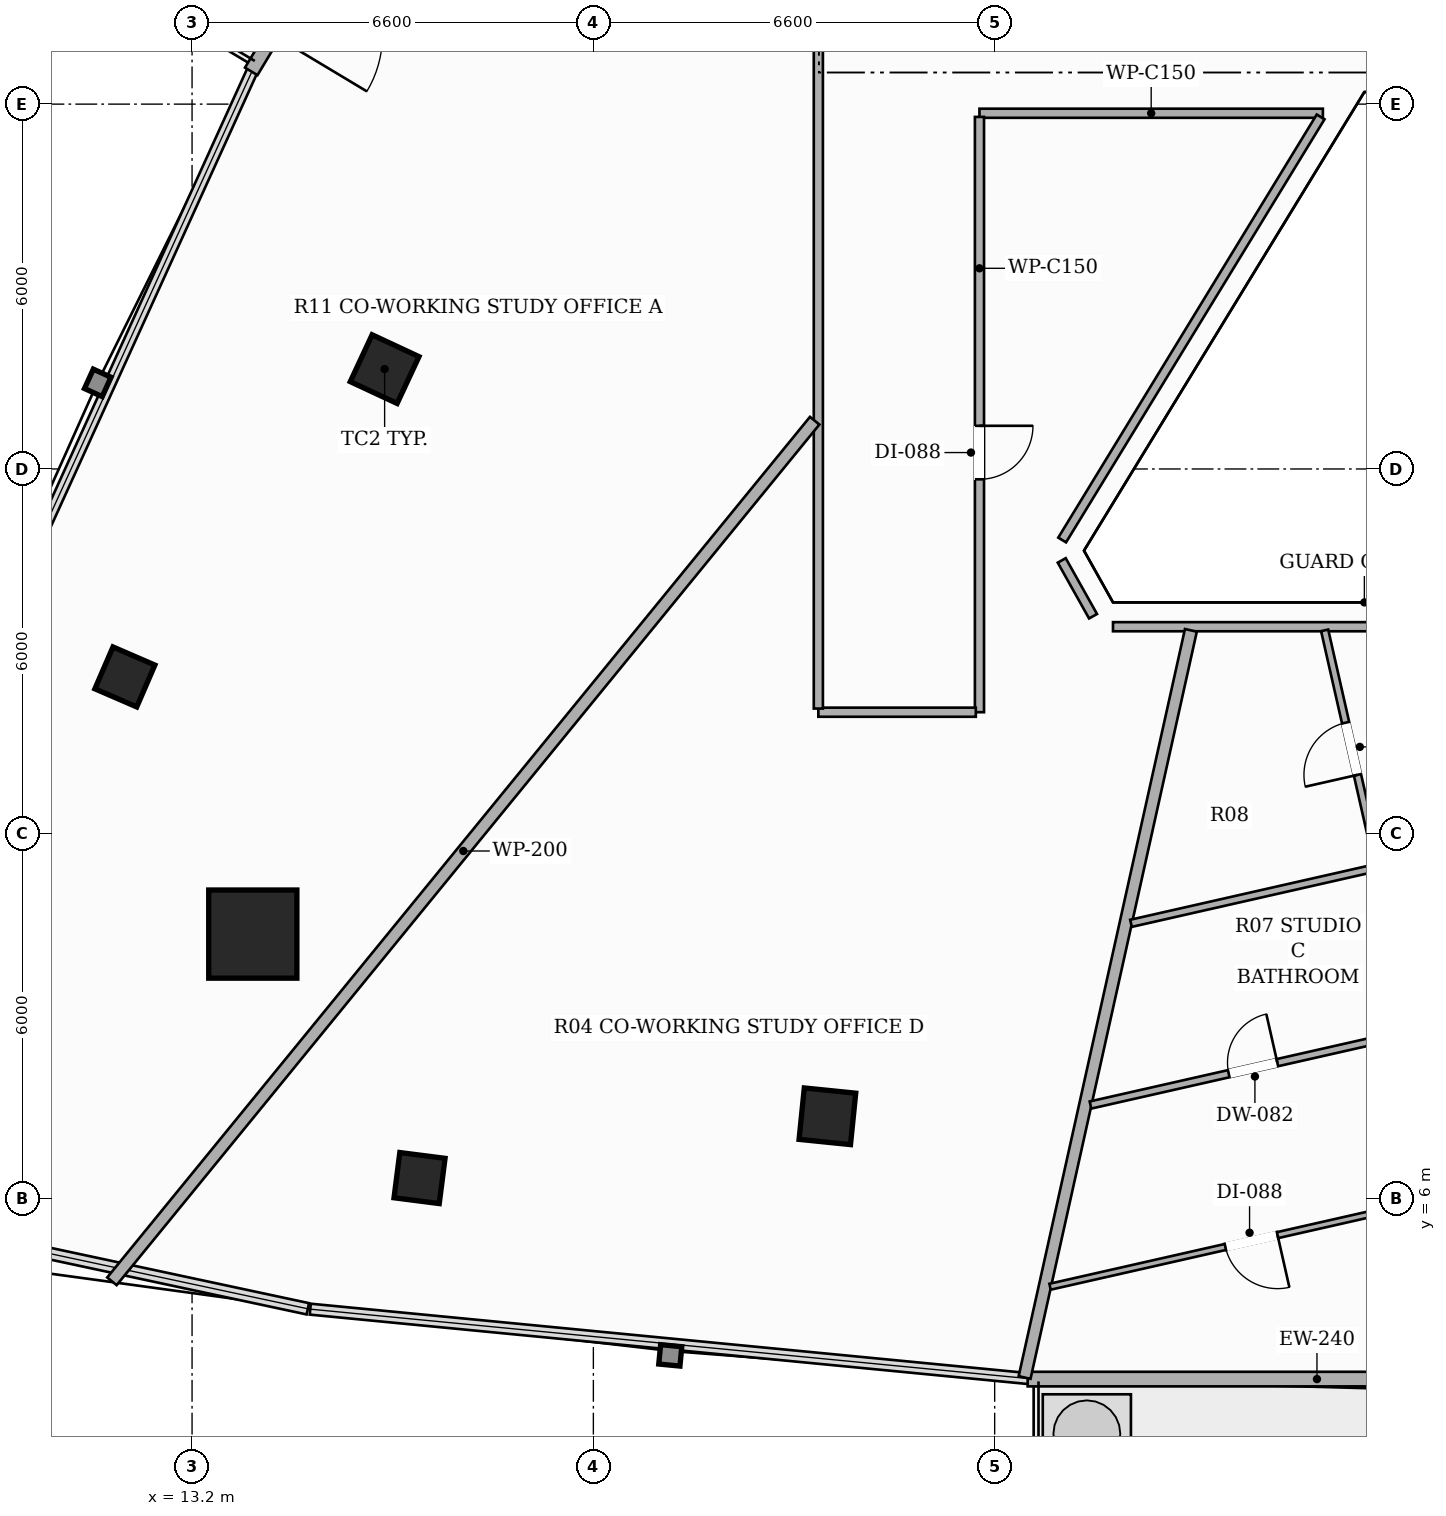
"""IFC4 building model, lengths in metres.
Left out: names, types, materials, properties, quantities, classifications, styles, units other than length and angle.
Written with IfcOpenShell. Run it as: python <this file> out.ifc"""

import sys

from ifc_helpers import new_model, si_unit, direction, frame, frame_2d, origin, origin_2d, place, context, subcontext, project, spatial, rectangle, hollow_rectangle, extrude, element, fill, save


model = new_model("IFC4")
c1 = context("Model", 3, precision=1e-05, world=origin(), true_north=direction((0.0, 1.0)))
c2 = subcontext(c1, "Body", "Model", "MODEL_VIEW")
j1 = project(units=[si_unit("LENGTHUNIT", "METRE"), si_unit("PLANEANGLEUNIT", "RADIAN")], contexts=[c1])
p1 = place(None, origin())
s1 = spatial("IfcSite", under=j1, at=p1, CompositionType="ELEMENT")
p2 = place(p1, origin())
s2 = spatial("IfcBuilding", under=s1, at=p2, CompositionType="ELEMENT")
p3 = place(p2, frame((0.0, 0.0, 123.2)))
s3 = spatial("IfcBuildingStorey", under=s2, at=p3, CompositionType="ELEMENT", Elevation=123.2)
p4 = place(p3, frame((14.199, 10.351, 0.0), z_axis=(0.0, 0.0, 1.0), x_axis=(1.0, 0.0, 0.0)))
e1 = element("IfcColumn", 1, at=p4, inside=s3, PredefinedType="COLUMN", context=c2, shape_type="SweptSolid", body=[
    extrude(hollow_rectangle(XDim=1.45, YDim=1.45, WallThickness=0.045, at=origin_2d()), origin(), (0.0, 0.0, 1.0), 3.3),
])
for number, where, z_axis, x_axis in (
    (2, (16.367, 19.642, 0.0), (0.0, 0.0, 1.0), (0.423, 0.906, 0.0)),
    (3, (23.649, 7.355, 0.0), (0.0, 0.0, 1.0), (-0.995, 0.101, 0.0)),
):
    element("IfcColumn", number, at=place(p3, frame(where, z_axis=z_axis, x_axis=x_axis)), inside=s3, PredefinedType="COLUMN", context=c2, shape_type="SweptSolid", body=[
        extrude(hollow_rectangle(XDim=0.85, YDim=0.85, WallThickness=0.028, at=origin_2d()), origin(), (0.0, 0.0, 1.0), 3.3),
    ])
for number, where, z_axis, x_axis in (
    (4, (12.095, 14.58, 0.0), (0.0, 0.0, 1.0), (0.397, 0.918, 0.0)),
    (5, (16.941, 6.339, 0.0), (0.0, 0.0, 1.0), (-0.992, 0.127, 0.0)),
):
    element("IfcColumn", number, at=place(p3, frame(where, z_axis=z_axis, x_axis=x_axis)), inside=s3, PredefinedType="COLUMN", context=c2, shape_type="SweptSolid", body=[
        extrude(hollow_rectangle(XDim=0.75, YDim=0.75, WallThickness=0.025, at=origin_2d()), origin(), (0.0, 0.0, 1.0), 3.3),
    ])
p5 = place(p3, frame((20.2, 34.586, 0.0), z_axis=(0.0, 0.0, 1.0), x_axis=(-0.514379309275, -0.857562782652, 0.0)))
e6 = element("IfcWall", 6, at=p5, inside=s3, PredefinedType="SOLIDWALL", context=c2, shape_type="SweptSolid", body=[
    extrude(rectangle(XDim=11.717, YDim=0.24, at=frame_2d((5.858, 0.0))), origin(), (0.0, 0.0, 1.0), 2.624),
])
p6 = place(p5, frame((9.22, 0.0, 0.0)))
e7 = element("IfcOpeningElement", 7, at=p6, cuts=e6, PredefinedType="OPENING", context=c2, shape_type="SweptSolid", body=[
    extrude(rectangle(XDim=1.8, YDim=2.2, at=frame_2d((0.9, 1.1))), frame((0.0, 0.13, 0.0), z_axis=(0.0, -1.0, 0.0), x_axis=(1.0, 0.0, 0.0)), (0.0, 0.0, 1.0), 0.26),
])
p7 = place(p3, frame((26.943, 3.033, 0.0), z_axis=(0.0, 0.0, 1.0), x_axis=(1.0, 0.0, 0.0)))
e8 = element("IfcWall", 8, at=p7, inside=s3, PredefinedType="SOLIDWALL", context=c2, shape_type="SweptSolid", body=[
    extrude(rectangle(XDim=12.114, YDim=0.24, at=frame_2d((6.057, 0.0))), origin(), (0.0, 0.0, 1.0), 2.624),
])
p8 = place(p7, frame((9.615, 0.0, 0.0)))
e9 = element("IfcOpeningElement", 9, at=p8, cuts=e8, PredefinedType="OPENING", context=c2, shape_type="SweptSolid", body=[
    extrude(rectangle(XDim=1.8, YDim=2.2, at=frame_2d((0.9, 1.1))), frame((0.0, 0.13, 0.0), z_axis=(0.0, -1.0, 0.0), x_axis=(1.0, 0.0, 0.0)), (0.0, 0.0, 1.0), 0.26),
])
p9 = place(p3, frame((31.798, 23.85, 0.0), z_axis=(0.0, 0.0, 1.0), x_axis=(-1.0, 0.0, 0.0)))
e10 = element("IfcWall", 10, at=p9, inside=s3, PredefinedType="PARTITIONING", context=c2, shape_type="SweptSolid", body=[
    extrude(rectangle(XDim=5.648, YDim=0.15, at=frame_2d((2.824, 0.0))), origin(), (0.0, 0.0, 1.0), 2.721),
])
p10 = place(p3, frame((26.15, 23.79, 0.0), z_axis=(0.0, 0.0, 1.0), x_axis=(0.0, -1.0, 0.0)))
e11 = element("IfcWall", 11, at=p10, inside=s3, PredefinedType="PARTITIONING", context=c2, shape_type="SweptSolid", body=[
    extrude(rectangle(XDim=9.79, YDim=0.15, at=frame_2d((4.895, 0.0))), origin(), (0.0, 0.0, 1.0), 2.721),
])
p11 = place(p10, frame((5.08, 0.0, 0.0)))
e12 = element("IfcOpeningElement", 12, at=p11, cuts=e11, PredefinedType="OPENING", context=c2, shape_type="SweptSolid", body=[
    extrude(rectangle(XDim=0.88, YDim=2.1, at=frame_2d((0.44, 1.05))), frame((0.0, 0.085, 0.0), z_axis=(0.0, -1.0, 0.0), x_axis=(1.0, 0.0, 0.0)), (0.0, 0.0, 1.0), 0.17),
])
p12 = place(p3, frame((26.09, 14.0, 0.0), z_axis=(0.0, 0.0, 1.0), x_axis=(-1.0, 0.0, 0.0)))
e13 = element("IfcWall", 13, at=p12, inside=s3, PredefinedType="PARTITIONING", context=c2, shape_type="SweptSolid", body=[
    extrude(rectangle(XDim=2.59, YDim=0.15, at=frame_2d((1.295, 0.0))), origin(), (0.0, 0.0, 1.0), 2.721),
])
p13 = place(p3, frame((23.5, 14.06, 0.0), z_axis=(0.0, 0.0, 1.0), x_axis=(0.0, 1.0, 0.0)))
e14 = element("IfcWall", 14, at=p13, inside=s3, PredefinedType="PARTITIONING", context=c2, shape_type="SweptSolid", body=[
    extrude(rectangle(XDim=22.84, YDim=0.15, at=frame_2d((11.42, 0.0))), origin(), (0.0, 0.0, 1.0), 2.413),
])
p14 = place(p13, frame((13.17, 0.0, 0.0)))
e15 = element("IfcOpeningElement", 15, at=p14, cuts=e14, PredefinedType="OPENING", context=c2, shape_type="SweptSolid", body=[
    extrude(rectangle(XDim=0.88, YDim=2.1, at=frame_2d((0.44, 1.05))), frame((0.0, 0.085, 0.0), z_axis=(0.0, -1.0, 0.0), x_axis=(1.0, 0.0, 0.0)), (0.0, 0.0, 1.0), 0.17),
])
p15 = place(p3, frame((37.654, 15.406, 0.0), z_axis=(0.0, 0.0, 1.0), x_axis=(-1.0, 0.0, 0.0)))
e16 = element("IfcWall", 16, at=p15, inside=s3, PredefinedType="PARTITIONING", context=c2, shape_type="SweptSolid", body=[
    extrude(rectangle(XDim=9.308, YDim=0.15, at=frame_2d((4.654, 0.0))), origin(), (0.0, 0.0, 1.0), 2.721),
])
p16 = place(p3, frame((28.018, 15.578, 0.0), z_axis=(0.0, 0.0, 1.0), x_axis=(-0.489281087794, 0.872126147485, 0.0)))
e17 = element("IfcWall", 17, at=p16, inside=s3, PredefinedType="PARTITIONING", context=c2, shape_type="SweptSolid", body=[
    extrude(rectangle(XDim=1.053, YDim=0.15, at=frame_2d((0.526, 0.0))), origin(), (0.0, 0.0, 1.0), 3.06),
])
p17 = place(p3, frame((27.51, 16.832, 0.0), z_axis=(0.0, 0.0, 1.0), x_axis=(0.521348270591, 0.853343999072, 0.0)))
e18 = element("IfcWall", 18, at=p17, inside=s3, PredefinedType="PARTITIONING", context=c2, shape_type="SweptSolid", body=[
    extrude(rectangle(XDim=8.154, YDim=0.15, at=frame_2d((4.077, 0.0))), origin(), (0.0, 0.0, 1.0), 2.721),
])
p18 = place(p3, frame((23.44, 18.794, 0.0), z_axis=(0.0, 0.0, 1.0), x_axis=(-0.632525219644, -0.774539764321, 0.0)))
e19 = element("IfcWall", 19, at=p18, inside=s3, PredefinedType="PARTITIONING", context=c2, shape_type="SweptSolid", body=[
    extrude(rectangle(XDim=18.272, YDim=0.2, at=frame_2d((9.136, 0.0))), origin(), (0.0, 0.0, 1.0), 2.413),
])
p19 = place(p3, frame((26.892, 3.059, 0.0), z_axis=(0.0, 0.0, 1.0), x_axis=(0.217267240277, 0.97611215867, 0.0)))
e20 = element("IfcWall", 20, at=p19, inside=s3, PredefinedType="PARTITIONING", context=c2, shape_type="SweptSolid", body=[
    extrude(rectangle(XDim=12.588, YDim=0.2, at=frame_2d((6.294, 0.0))), origin(), (0.0, 0.0, 1.0), 2.413),
])
p20 = place(p3, frame((27.976, 7.54, 0.0), z_axis=(0.0, 0.0, 1.0), x_axis=(0.975262605336, 0.221049430295, 0.0)))
e21 = element("IfcWall", 21, at=p20, inside=s3, PredefinedType="PARTITIONING", context=c2, shape_type="SweptSolid", body=[
    extrude(rectangle(XDim=5.483, YDim=0.12, at=frame_2d((2.741, 0.0))), origin(), (0.0, 0.0, 1.0), 2.413),
])
p21 = place(p20, frame((2.331, 0.0, 0.0)))
e22 = element("IfcOpeningElement", 22, at=p21, cuts=e21, PredefinedType="OPENING", context=c2, shape_type="SweptSolid", body=[
    extrude(rectangle(XDim=0.82, YDim=2.1, at=frame_2d((0.41, 1.05))), frame((0.0, 0.07, 0.0), z_axis=(0.0, -1.0, 0.0), x_axis=(1.0, 0.0, 0.0)), (0.0, 0.0, 1.0), 0.14),
])
p22 = place(p3, frame((32.711, 11.451, 0.0), z_axis=(0.0, 0.0, 1.0), x_axis=(-0.221335761288, 0.975197662413, 0.0)))
e23 = element("IfcWall", 23, at=p22, inside=s3, PredefinedType="PARTITIONING", context=c2, shape_type="SweptSolid", body=[
    extrude(rectangle(XDim=3.994, YDim=0.12, at=frame_2d((1.997, 0.0))), origin(), (0.0, 0.0, 1.0), 2.721),
])
p23 = place(p22, frame((1.557, 0.0, 0.0)))
e24 = element("IfcOpeningElement", 24, at=p23, cuts=e23, PredefinedType="OPENING", context=c2, shape_type="SweptSolid", body=[
    extrude(rectangle(XDim=0.88, YDim=2.1, at=frame_2d((0.44, 1.05))), frame((0.0, 0.07, 0.0), z_axis=(0.0, -1.0, 0.0), x_axis=(1.0, 0.0, 0.0)), (0.0, 0.0, 1.0), 0.14),
])
p24 = place(p3, frame((33.935, 6.054, 0.0), z_axis=(0.0, 0.0, 1.0), x_axis=(-0.975244308244, -0.221130140952, 0.0)))
e25 = element("IfcWall", 25, at=p24, inside=s3, PredefinedType="PARTITIONING", context=c2, shape_type="SweptSolid", body=[
    extrude(rectangle(XDim=6.792, YDim=0.1, at=frame_2d((3.396, 0.0))), origin(), (0.0, 0.0, 1.0), 3.06),
])
p25 = place(p24, frame((2.956, 0.0, 0.0)))
e26 = element("IfcOpeningElement", 26, at=p25, cuts=e25, PredefinedType="OPENING", context=c2, shape_type="SweptSolid", body=[
    extrude(rectangle(XDim=0.88, YDim=2.1, at=frame_2d((0.44, 1.05))), frame((0.0, 0.06, 0.0), z_axis=(0.0, -1.0, 0.0), x_axis=(1.0, 0.0, 0.0)), (0.0, 0.0, 1.0), 0.12),
])
p26 = place(p3, frame((28.642, 10.528, 0.0), z_axis=(0.0, 0.0, 1.0), x_axis=(0.975230479555, 0.221191120408, 0.0)))
e27 = element("IfcWall", 27, at=p26, inside=s3, PredefinedType="PARTITIONING", context=c2, shape_type="SweptSolid", body=[
    extrude(rectangle(XDim=4.172, YDim=0.12, at=frame_2d((2.086, 0.0))), origin(), (0.0, 0.0, 1.0), 2.721),
])
p27 = place(p21, origin())
e28 = element("IfcDoor", 28, at=p27, inside=s3, OperationType="SINGLE_SWING_RIGHT", PredefinedType="DOOR", context=c2, shape_type="SweptSolid", body=[
    extrude(rectangle(XDim=0.82, YDim=2.1, at=frame_2d((0.41, 1.05))), frame((0.0, 0.025, 0.0), z_axis=(0.0, -1.0, 0.0), x_axis=(1.0, 0.0, 0.0)), (0.0, 0.0, 1.0), 0.05),
])
fill(e22, e28)
p28 = place(p23, origin())
e29 = element("IfcDoor", 29, at=p28, inside=s3, OperationType="SINGLE_SWING_LEFT", PredefinedType="DOOR", context=c2, shape_type="SweptSolid", body=[
    extrude(rectangle(XDim=0.88, YDim=2.1, at=frame_2d((0.44, 1.05))), frame((0.0, 0.025, 0.0), z_axis=(0.0, -1.0, 0.0), x_axis=(1.0, 0.0, 0.0)), (0.0, 0.0, 1.0), 0.05),
])
fill(e24, e29)
p29 = place(p25, origin())
e30 = element("IfcDoor", 30, at=p29, inside=s3, OperationType="SINGLE_SWING_LEFT", PredefinedType="DOOR", context=c2, shape_type="SweptSolid", body=[
    extrude(rectangle(XDim=0.88, YDim=2.1, at=frame_2d((0.44, 1.05))), frame((0.0, 0.025, 0.0), z_axis=(0.0, -1.0, 0.0), x_axis=(1.0, 0.0, 0.0)), (0.0, 0.0, 1.0), 0.05),
])
fill(e26, e30)
p30 = place(p11, origin())
e31 = element("IfcDoor", 31, at=p30, inside=s3, OperationType="SINGLE_SWING_LEFT", PredefinedType="DOOR", context=c2, shape_type="SweptSolid", body=[
    extrude(rectangle(XDim=0.88, YDim=2.1, at=frame_2d((0.44, 1.05))), frame((0.0, 0.025, 0.0), z_axis=(0.0, -1.0, 0.0), x_axis=(1.0, 0.0, 0.0)), (0.0, 0.0, 1.0), 0.05),
])
fill(e12, e31)
save(model, sys.argv[1])
